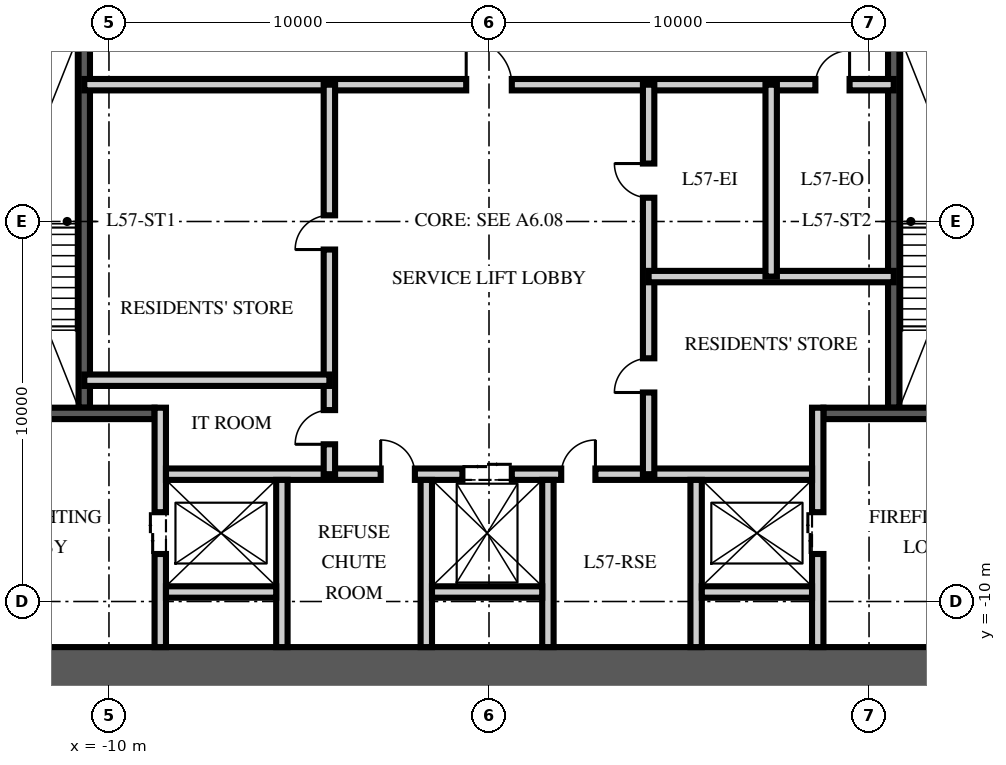
"""IFC4 building model, lengths in metres.
Left out: names, types, materials, properties, quantities, classifications, styles, units other than length and angle.
Written with IfcOpenShell. Run it as: python <this file> out.ifc"""

import sys

from ifc_helpers import new_model, si_unit, direction, frame, frame_2d, origin, place, context, subcontext, project, spatial, rectangle, extrude, element, fill, save


model = new_model("IFC4")
c1 = context("Model", 3, precision=1e-05, world=origin(), true_north=direction((0.0, 1.0)))
c2 = subcontext(c1, "Body", "Model", "MODEL_VIEW")
j1 = project(units=[si_unit("LENGTHUNIT", "METRE"), si_unit("PLANEANGLEUNIT", "RADIAN")], contexts=[c1])
p1 = place(None, origin())
s1 = spatial("IfcSite", under=j1, at=p1, CompositionType="ELEMENT")
p2 = place(p1, origin())
s2 = spatial("IfcBuilding", under=s1, at=p2, CompositionType="ELEMENT")
p3 = place(p2, frame((0.0, 0.0, 229.5)))
s3 = spatial("IfcBuildingStorey", under=s2, at=p3, CompositionType="ELEMENT", Elevation=229.5)
p4 = place(p3, frame((-15.5, -12.0, -0.25), z_axis=(0.0, 0.0, 1.0), x_axis=(1.0, 0.0, 0.0)))
e1 = element("IfcWall", 1, at=p4, inside=s3, PredefinedType="SHEAR", context=c2, shape_type="SweptSolid", body=[
    extrude(rectangle(XDim=31.0, YDim=1.6, at=frame_2d((15.5, 0.0))), origin(), (0.0, 0.0, 1.0), 3.75),
])
p5 = place(p3, frame((-10.65, -4.9, 0.0), z_axis=(0.0, 0.0, 1.0), x_axis=(0.0, 1.0, 0.0)))
e2 = element("IfcWall", 2, at=p5, inside=s3, PredefinedType="SOLIDWALL", context=c2, shape_type="SweptSolid", body=[
    extrude(rectangle(XDim=10.1, YDim=0.3, at=frame_2d((5.05, 0.0))), origin(), (0.0, 0.0, 1.0), 3.5),
])
p6 = place(p3, frame((-14.7, -5.05, 0.0), z_axis=(0.0, 0.0, 1.0), x_axis=(1.0, 0.0, 0.0)))
e3 = element("IfcWall", 3, at=p6, inside=s3, PredefinedType="SOLIDWALL", context=c2, shape_type="SweptSolid", body=[
    extrude(rectangle(XDim=5.9, YDim=0.3, at=frame_2d((2.95, 0.0))), origin(), (0.0, 0.0, 1.0), 3.5),
])
p7 = place(p6, frame((1.35, 0.0, 0.0)))
e4 = element("IfcOpeningElement", 4, at=p7, cuts=e3, PredefinedType="OPENING", context=c2, shape_type="SweptSolid", body=[
    extrude(rectangle(XDim=1.2, YDim=2.1, at=frame_2d((0.6, 1.05))), frame((0.0, 0.16, 0.0), z_axis=(0.0, -1.0, 0.0), x_axis=(1.0, 0.0, 0.0)), (0.0, 0.0, 1.0), 0.32),
])
p8 = place(p3, frame((-8.65, -11.2, 0.0), z_axis=(0.0, 0.0, 1.0), x_axis=(0.0, 1.0, 0.0)))
e5 = element("IfcWall", 5, at=p8, inside=s3, PredefinedType="PARTITIONING", context=c2, shape_type="SweptSolid", body=[
    extrude(rectangle(XDim=6.3, YDim=0.3, at=frame_2d((3.15, 0.0))), origin(), (0.0, 0.0, 1.0), 3.5),
])
p9 = place(p8, frame((2.45, 0.0, 0.0)))
e6 = element("IfcOpeningElement", 6, at=p9, cuts=e5, PredefinedType="OPENING", context=c2, shape_type="SweptSolid", body=[
    extrude(rectangle(XDim=1.1, YDim=2.1, at=frame_2d((0.55, 1.05))), frame((0.0, 0.16, 0.0), z_axis=(0.0, -1.0, 0.0), x_axis=(1.0, 0.0, 0.0)), (0.0, 0.0, 1.0), 0.32),
])
p10 = place(p3, frame((10.65, -4.9, 0.0), z_axis=(0.0, 0.0, 1.0), x_axis=(0.0, 1.0, 0.0)))
e7 = element("IfcWall", 7, at=p10, inside=s3, PredefinedType="SOLIDWALL", context=c2, shape_type="SweptSolid", body=[
    extrude(rectangle(XDim=10.1, YDim=0.3, at=frame_2d((5.05, 0.0))), origin(), (0.0, 0.0, 1.0), 3.5),
])
p11 = place(p3, frame((14.7, -5.05, 0.0), z_axis=(0.0, 0.0, 1.0), x_axis=(-1.0, 0.0, 0.0)))
e8 = element("IfcWall", 8, at=p11, inside=s3, PredefinedType="SOLIDWALL", context=c2, shape_type="SweptSolid", body=[
    extrude(rectangle(XDim=5.9, YDim=0.3, at=frame_2d((2.95, 0.0))), origin(), (0.0, 0.0, 1.0), 3.5),
])
p12 = place(p11, frame((1.35, 0.0, 0.0)))
e9 = element("IfcOpeningElement", 9, at=p12, cuts=e8, PredefinedType="OPENING", context=c2, shape_type="SweptSolid", body=[
    extrude(rectangle(XDim=1.2, YDim=2.1, at=frame_2d((0.6, 1.05))), frame((0.0, 0.16, 0.0), z_axis=(0.0, -1.0, 0.0), x_axis=(1.0, 0.0, 0.0)), (0.0, 0.0, 1.0), 0.32),
])
p13 = place(p3, frame((8.65, -11.2, 0.0), z_axis=(0.0, 0.0, 1.0), x_axis=(0.0, 1.0, 0.0)))
e10 = element("IfcWall", 10, at=p13, inside=s3, PredefinedType="PARTITIONING", context=c2, shape_type="SweptSolid", body=[
    extrude(rectangle(XDim=6.3, YDim=0.3, at=frame_2d((3.15, 0.0))), origin(), (0.0, 0.0, 1.0), 3.5),
])
p14 = place(p13, frame((2.45, 0.0, 0.0)))
e11 = element("IfcOpeningElement", 11, at=p14, cuts=e10, PredefinedType="OPENING", context=c2, shape_type="SweptSolid", body=[
    extrude(rectangle(XDim=1.1, YDim=2.1, at=frame_2d((0.55, 1.05))), frame((0.0, 0.16, 0.0), z_axis=(0.0, -1.0, 0.0), x_axis=(1.0, 0.0, 0.0)), (0.0, 0.0, 1.0), 0.32),
])
p15 = place(p3, frame((-8.5, -6.65, 0.0), z_axis=(0.0, 0.0, 1.0), x_axis=(1.0, 0.0, 0.0)))
e12 = element("IfcWall", 12, at=p15, inside=s3, PredefinedType="PARTITIONING", context=c2, shape_type="SweptSolid", body=[
    extrude(rectangle(XDim=17.0, YDim=0.3, at=frame_2d((8.5, 0.0))), origin(), (0.0, 0.0, 1.0), 3.5),
])
p16 = place(p15, frame((7.8, 0.0, 0.0)))
e13 = element("IfcOpeningElement", 13, at=p16, cuts=e12, PredefinedType="OPENING", context=c2, shape_type="SweptSolid", body=[
    extrude(rectangle(XDim=1.3, YDim=2.4, at=frame_2d((0.65, 1.2))), frame((0.0, 0.16, 0.0), z_axis=(0.0, -1.0, 0.0), x_axis=(1.0, 0.0, 0.0)), (0.0, 0.0, 1.0), 0.32),
])
p17 = place(p15, frame((5.65, 0.0, 0.0)))
e14 = element("IfcOpeningElement", 14, at=p17, cuts=e12, PredefinedType="OPENING", context=c2, shape_type="SweptSolid", body=[
    extrude(rectangle(XDim=0.9, YDim=2.1, at=frame_2d((0.45, 1.05))), frame((0.0, 0.16, 0.0), z_axis=(0.0, -1.0, 0.0), x_axis=(1.0, 0.0, 0.0)), (0.0, 0.0, 1.0), 0.32),
])
p18 = place(p15, frame((10.4, 0.0, 0.0)))
e15 = element("IfcOpeningElement", 15, at=p18, cuts=e12, PredefinedType="OPENING", context=c2, shape_type="SweptSolid", body=[
    extrude(rectangle(XDim=0.9, YDim=2.1, at=frame_2d((0.45, 1.05))), frame((0.0, 0.16, 0.0), z_axis=(0.0, -1.0, 0.0), x_axis=(1.0, 0.0, 0.0)), (0.0, 0.0, 1.0), 0.32),
])
for number, where, z_axis, x_axis in (
    (16, (-5.45, -11.2, 0.0), (0.0, 0.0, 1.0), (0.0, 1.0, 0.0)),
    (17, (-1.65, -11.2, 0.0), (0.0, 0.0, 1.0), (0.0, 1.0, 0.0)),
    (18, (1.55, -11.2, 0.0), (0.0, 0.0, 1.0), (0.0, 1.0, 0.0)),
    (19, (5.45, -11.2, 0.0), (0.0, 0.0, 1.0), (0.0, 1.0, 0.0)),
):
    element("IfcWall", number, at=place(p3, frame(where, z_axis=z_axis, x_axis=x_axis)), inside=s3, PredefinedType="PARTITIONING", context=c2, shape_type="SweptSolid", body=[
        extrude(rectangle(XDim=4.4, YDim=0.3, at=frame_2d((2.2, 0.0))), origin(), (0.0, 0.0, 1.0), 3.5),
    ])
for number, where, z_axis, x_axis in (
    (20, (-8.5, -9.75, 0.0), (0.0, 0.0, 1.0), (1.0, 0.0, 0.0)),
    (21, (-1.5, -9.75, 0.0), (0.0, 0.0, 1.0), (1.0, 0.0, 0.0)),
    (22, (5.6, -9.75, 0.0), (0.0, 0.0, 1.0), (1.0, 0.0, 0.0)),
):
    element("IfcWall", number, at=place(p3, frame(where, z_axis=z_axis, x_axis=x_axis)), inside=s3, PredefinedType="PARTITIONING", context=c2, shape_type="SweptSolid", body=[
        extrude(rectangle(XDim=2.9, YDim=0.3, at=frame_2d((1.45, 0.0))), origin(), (0.0, 0.0, 1.0), 3.5),
    ])
p19 = place(p3, frame((-10.65, 3.6, 0.0), z_axis=(0.0, 0.0, 1.0), x_axis=(1.0, 0.0, 0.0)))
e23 = element("IfcWall", 23, at=p19, inside=s3, PredefinedType="PARTITIONING", context=c2, shape_type="SweptSolid", body=[
    extrude(rectangle(XDim=21.3, YDim=0.3, at=frame_2d((10.65, 0.0))), origin(), (0.0, 0.0, 1.0), 3.5),
])
p20 = place(p19, frame((10.05, 0.0, 0.0)))
e24 = element("IfcOpeningElement", 24, at=p20, cuts=e23, PredefinedType="OPENING", context=c2, shape_type="SweptSolid", body=[
    extrude(rectangle(XDim=1.2, YDim=2.1, at=frame_2d((0.6, 1.05))), frame((0.0, 0.16, 0.0), z_axis=(0.0, -1.0, 0.0), x_axis=(1.0, 0.0, 0.0)), (0.0, 0.0, 1.0), 0.32),
])
p21 = place(p19, frame((19.238, 0.0, 0.0)))
e25 = element("IfcOpeningElement", 25, at=p21, cuts=e23, PredefinedType="OPENING", context=c2, shape_type="SweptSolid", body=[
    extrude(rectangle(XDim=0.9, YDim=2.1, at=frame_2d((0.45, 1.05))), frame((0.0, 0.16, 0.0), z_axis=(0.0, -1.0, 0.0), x_axis=(1.0, 0.0, 0.0)), (0.0, 0.0, 1.0), 0.32),
])
p22 = place(p3, frame((-4.2, -6.65, 0.0), z_axis=(0.0, 0.0, 1.0), x_axis=(0.0, 1.0, 0.0)))
e26 = element("IfcWall", 26, at=p22, inside=s3, PredefinedType="PARTITIONING", context=c2, shape_type="SweptSolid", body=[
    extrude(rectangle(XDim=10.25, YDim=0.3, at=frame_2d((5.125, 0.0))), origin(), (0.0, 0.0, 1.0), 3.5),
])
p23 = place(p22, frame((0.787, 0.0, 0.0)))
e27 = element("IfcOpeningElement", 27, at=p23, cuts=e26, PredefinedType="OPENING", context=c2, shape_type="SweptSolid", body=[
    extrude(rectangle(XDim=0.9, YDim=2.1, at=frame_2d((0.45, 1.05))), frame((0.0, 0.16, 0.0), z_axis=(0.0, -1.0, 0.0), x_axis=(1.0, 0.0, 0.0)), (0.0, 0.0, 1.0), 0.32),
])
p24 = place(p22, frame((5.912, 0.0, 0.0)))
e28 = element("IfcOpeningElement", 28, at=p24, cuts=e26, PredefinedType="OPENING", context=c2, shape_type="SweptSolid", body=[
    extrude(rectangle(XDim=0.9, YDim=2.1, at=frame_2d((0.45, 1.05))), frame((0.0, 0.16, 0.0), z_axis=(0.0, -1.0, 0.0), x_axis=(1.0, 0.0, 0.0)), (0.0, 0.0, 1.0), 0.32),
])
p25 = place(p3, frame((4.2, -6.65, 0.0), z_axis=(0.0, 0.0, 1.0), x_axis=(0.0, 1.0, 0.0)))
e29 = element("IfcWall", 29, at=p25, inside=s3, PredefinedType="PARTITIONING", context=c2, shape_type="SweptSolid", body=[
    extrude(rectangle(XDim=10.25, YDim=0.3, at=frame_2d((5.125, 0.0))), origin(), (0.0, 0.0, 1.0), 3.5),
])
p26 = place(p25, frame((2.15, 0.0, 0.0)))
e30 = element("IfcOpeningElement", 30, at=p26, cuts=e29, PredefinedType="OPENING", context=c2, shape_type="SweptSolid", body=[
    extrude(rectangle(XDim=0.9, YDim=2.1, at=frame_2d((0.45, 1.05))), frame((0.0, 0.16, 0.0), z_axis=(0.0, -1.0, 0.0), x_axis=(1.0, 0.0, 0.0)), (0.0, 0.0, 1.0), 0.32),
])
p27 = place(p25, frame((7.275, 0.0, 0.0)))
e31 = element("IfcOpeningElement", 31, at=p27, cuts=e29, PredefinedType="OPENING", context=c2, shape_type="SweptSolid", body=[
    extrude(rectangle(XDim=0.9, YDim=2.1, at=frame_2d((0.45, 1.05))), frame((0.0, 0.16, 0.0), z_axis=(0.0, -1.0, 0.0), x_axis=(1.0, 0.0, 0.0)), (0.0, 0.0, 1.0), 0.32),
])
for number, where, z_axis, x_axis in (
    (32, (-10.65, -4.177, 0.0), (0.0, 0.0, 1.0), (1.0, 0.0, 0.0)),
    (33, (10.65, -1.45, 0.0), (0.0, 0.0, 1.0), (-1.0, 0.0, 0.0)),
):
    element("IfcWall", number, at=place(p3, frame(where, z_axis=z_axis, x_axis=x_axis)), inside=s3, PredefinedType="PARTITIONING", context=c2, shape_type="SweptSolid", body=[
        extrude(rectangle(XDim=6.45, YDim=0.3, at=frame_2d((3.225, 0.0))), origin(), (0.0, 0.0, 1.0), 3.5),
    ])
p28 = place(p3, frame((7.425, -1.45, 0.0), z_axis=(0.0, 0.0, 1.0), x_axis=(0.0, 1.0, 0.0)))
e34 = element("IfcWall", 34, at=p28, inside=s3, PredefinedType="PARTITIONING", context=c2, shape_type="SweptSolid", body=[
    extrude(rectangle(XDim=5.05, YDim=0.3, at=frame_2d((2.525, 0.0))), origin(), (0.0, 0.0, 1.0), 3.5),
])
p29 = place(p9, origin())
e35 = element("IfcDoor", 35, at=p29, inside=s3, OperationType="DOUBLE_DOOR_SLIDING", PredefinedType="DOOR", context=c2, shape_type="SweptSolid", body=[
    extrude(rectangle(XDim=1.1, YDim=2.1, at=frame_2d((0.55, 1.05))), frame((0.0, 0.025, 0.0), z_axis=(0.0, -1.0, 0.0), x_axis=(1.0, 0.0, 0.0)), (0.0, 0.0, 1.0), 0.05),
])
fill(e6, e35)
p30 = place(p14, origin())
e36 = element("IfcDoor", 36, at=p30, inside=s3, OperationType="DOUBLE_DOOR_SLIDING", PredefinedType="DOOR", context=c2, shape_type="SweptSolid", body=[
    extrude(rectangle(XDim=1.1, YDim=2.1, at=frame_2d((0.55, 1.05))), frame((0.0, 0.025, 0.0), z_axis=(0.0, -1.0, 0.0), x_axis=(1.0, 0.0, 0.0)), (0.0, 0.0, 1.0), 0.05),
])
fill(e11, e36)
p31 = place(p16, origin())
e37 = element("IfcDoor", 37, at=p31, inside=s3, OperationType="DOUBLE_DOOR_SLIDING", PredefinedType="DOOR", context=c2, shape_type="SweptSolid", body=[
    extrude(rectangle(XDim=1.3, YDim=2.4, at=frame_2d((0.65, 1.2))), frame((0.0, 0.025, 0.0), z_axis=(0.0, -1.0, 0.0), x_axis=(1.0, 0.0, 0.0)), (0.0, 0.0, 1.0), 0.05),
])
fill(e13, e37)
p32 = place(p20, origin())
e38 = element("IfcDoor", 38, at=p32, inside=s3, OperationType="SINGLE_SWING_LEFT", PredefinedType="DOOR", context=c2, shape_type="SweptSolid", body=[
    extrude(rectangle(XDim=1.2, YDim=2.1, at=frame_2d((0.6, 1.05))), frame((0.0, 0.025, 0.0), z_axis=(0.0, -1.0, 0.0), x_axis=(1.0, 0.0, 0.0)), (0.0, 0.0, 1.0), 0.05),
])
fill(e24, e38)
p33 = place(p17, origin())
e39 = element("IfcDoor", 39, at=p33, inside=s3, OperationType="SINGLE_SWING_LEFT", PredefinedType="DOOR", context=c2, shape_type="SweptSolid", body=[
    extrude(rectangle(XDim=0.9, YDim=2.1, at=frame_2d((0.45, 1.05))), frame((0.0, 0.025, 0.0), z_axis=(0.0, -1.0, 0.0), x_axis=(1.0, 0.0, 0.0)), (0.0, 0.0, 1.0), 0.05),
])
fill(e14, e39)
p34 = place(p18, origin())
e40 = element("IfcDoor", 40, at=p34, inside=s3, OperationType="SINGLE_SWING_RIGHT", PredefinedType="DOOR", context=c2, shape_type="SweptSolid", body=[
    extrude(rectangle(XDim=0.9, YDim=2.1, at=frame_2d((0.45, 1.05))), frame((0.0, 0.025, 0.0), z_axis=(0.0, -1.0, 0.0), x_axis=(1.0, 0.0, 0.0)), (0.0, 0.0, 1.0), 0.05),
])
fill(e15, e40)
p35 = place(p23, origin())
e41 = element("IfcDoor", 41, at=p35, inside=s3, OperationType="SINGLE_SWING_LEFT", PredefinedType="DOOR", context=c2, shape_type="SweptSolid", body=[
    extrude(rectangle(XDim=0.9, YDim=2.1, at=frame_2d((0.45, 1.05))), frame((0.0, 0.025, 0.0), z_axis=(0.0, -1.0, 0.0), x_axis=(1.0, 0.0, 0.0)), (0.0, 0.0, 1.0), 0.05),
])
fill(e27, e41)
p36 = place(p24, origin())
e42 = element("IfcDoor", 42, at=p36, inside=s3, OperationType="SINGLE_SWING_LEFT", PredefinedType="DOOR", context=c2, shape_type="SweptSolid", body=[
    extrude(rectangle(XDim=0.9, YDim=2.1, at=frame_2d((0.45, 1.05))), frame((0.0, 0.025, 0.0), z_axis=(0.0, -1.0, 0.0), x_axis=(1.0, 0.0, 0.0)), (0.0, 0.0, 1.0), 0.05),
])
fill(e28, e42)
p37 = place(p26, origin())
e43 = element("IfcDoor", 43, at=p37, inside=s3, OperationType="SINGLE_SWING_LEFT", PredefinedType="DOOR", context=c2, shape_type="SweptSolid", body=[
    extrude(rectangle(XDim=0.9, YDim=2.1, at=frame_2d((0.45, 1.05))), frame((0.0, 0.025, 0.0), z_axis=(0.0, -1.0, 0.0), x_axis=(1.0, 0.0, 0.0)), (0.0, 0.0, 1.0), 0.05),
])
fill(e30, e43)
p38 = place(p27, origin())
e44 = element("IfcDoor", 44, at=p38, inside=s3, OperationType="SINGLE_SWING_RIGHT", PredefinedType="DOOR", context=c2, shape_type="SweptSolid", body=[
    extrude(rectangle(XDim=0.9, YDim=2.1, at=frame_2d((0.45, 1.05))), frame((0.0, 0.025, 0.0), z_axis=(0.0, -1.0, 0.0), x_axis=(1.0, 0.0, 0.0)), (0.0, 0.0, 1.0), 0.05),
])
fill(e31, e44)
p39 = place(p21, origin())
e45 = element("IfcDoor", 45, at=p39, inside=s3, OperationType="SINGLE_SWING_RIGHT", PredefinedType="DOOR", context=c2, shape_type="SweptSolid", body=[
    extrude(rectangle(XDim=0.9, YDim=2.1, at=frame_2d((0.45, 1.05))), frame((0.0, 0.025, 0.0), z_axis=(0.0, -1.0, 0.0), x_axis=(1.0, 0.0, 0.0)), (0.0, 0.0, 1.0), 0.05),
])
fill(e25, e45)
save(model, sys.argv[1])
